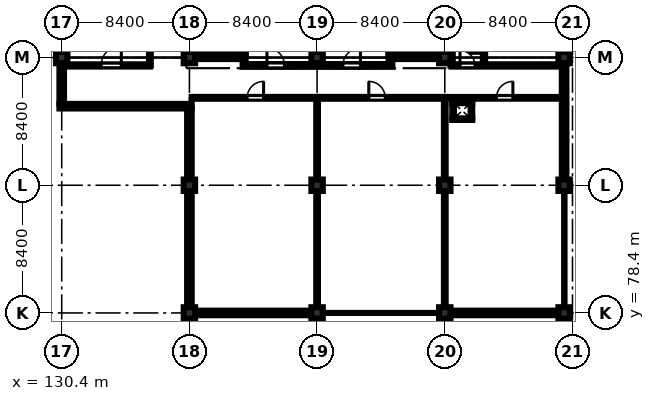
"""IFC4 building model, lengths in metres.
Left out: names, types, materials, properties, quantities, classifications, styles, units other than length and angle.
Written with IfcOpenShell. Run it as: python <this file> out.ifc"""

import sys

from ifc_helpers import new_model, si_unit, direction, frame, frame_2d, origin, origin_2d, place, context, subcontext, project, spatial, rectangle, extrude, element, fill, save


model = new_model("IFC4")
c1 = context("Model", 3, precision=1e-05, world=origin(), true_north=direction((0.0, 1.0)))
c2 = subcontext(c1, "Body", "Model", "MODEL_VIEW")
j1 = project(units=[si_unit("LENGTHUNIT", "METRE"), si_unit("PLANEANGLEUNIT", "RADIAN")], contexts=[c1])
p1 = place(None, origin())
s1 = spatial("IfcSite", under=j1, at=p1, CompositionType="ELEMENT")
p2 = place(p1, origin())
s2 = spatial("IfcBuilding", under=s1, at=p2, CompositionType="ELEMENT")
p3 = place(p2, frame((0.0, 0.0, 52.8)))
s3 = spatial("IfcBuildingStorey", under=s2, at=p3, CompositionType="ELEMENT", Elevation=52.8)
for number, where, z_axis, x_axis in (
    (1, (130.4, 95.2, 0.0), (0.0, 0.0, 1.0), (1.0, 0.0, 0.0)),
    (2, (138.8, 78.4, 0.0), (0.0, 0.0, 1.0), (1.0, 0.0, 0.0)),
    (3, (138.8, 86.8, 0.0), (0.0, 0.0, 1.0), (1.0, 0.0, 0.0)),
    (4, (138.8, 95.2, 0.0), (0.0, 0.0, 1.0), (1.0, 0.0, 0.0)),
    (5, (147.2, 78.4, 0.0), (0.0, 0.0, 1.0), (1.0, 0.0, 0.0)),
    (6, (147.2, 86.8, 0.0), (0.0, 0.0, 1.0), (1.0, 0.0, 0.0)),
    (7, (147.2, 95.2, 0.0), (0.0, 0.0, 1.0), (1.0, 0.0, 0.0)),
    (8, (155.6, 78.4, 0.0), (0.0, 0.0, 1.0), (1.0, 0.0, 0.0)),
    (9, (155.6, 86.8, 0.0), (0.0, 0.0, 1.0), (1.0, 0.0, 0.0)),
    (10, (155.6, 95.2, 0.0), (0.0, 0.0, 1.0), (1.0, 0.0, 0.0)),
    (11, (163.45, 78.4, 0.0), (0.0, 0.0, 1.0), (1.0, 0.0, 0.0)),
    (12, (163.45, 86.8, 0.0), (0.0, 0.0, 1.0), (1.0, 0.0, 0.0)),
    (13, (163.45, 95.2, 0.0), (0.0, 0.0, 1.0), (1.0, 0.0, 0.0)),
):
    element("IfcColumn", number, at=place(p3, frame(where, z_axis=z_axis, x_axis=x_axis)), inside=s3, PredefinedType="COLUMN", context=c2, shape_type="SweptSolid", body=[
        extrude(rectangle(XDim=0.75, YDim=0.75, at=origin_2d()), origin(), (0.0, 0.0, 1.0), 4.03),
    ])
p4 = place(p3, frame((138.7, 95.275, 0.0), z_axis=(0.0, 0.0, 1.0), x_axis=(1.0, 0.0, 0.0)))
e14 = element("IfcWall", 14, at=p4, inside=s3, PredefinedType="SHEAR", context=c2, shape_type="SweptSolid", body=[
    extrude(rectangle(XDim=3.8, YDim=0.35, at=frame_2d((1.9, 0.0))), origin(), (0.0, 0.0, 1.0), 4.03),
])
p5 = place(p3, frame((138.875, 95.45, 0.0), z_axis=(0.0, 0.0, 1.0), x_axis=(0.0, 1.0, 0.0)))
e15 = element("IfcWall", 15, at=p5, inside=s3, PredefinedType="SHEAR", context=c2, shape_type="SweptSolid", body=[
    extrude(rectangle(XDim=7.9, YDim=0.35, at=frame_2d((3.95, 0.0))), origin(), (0.0, 0.0, 1.0), 4.03),
])
p6 = place(p3, frame((142.325, 95.45, 0.0), z_axis=(0.0, 0.0, 1.0), x_axis=(0.0, 1.0, 0.0)))
e16 = element("IfcWall", 16, at=p6, inside=s3, PredefinedType="SHEAR", context=c2, shape_type="SweptSolid", body=[
    extrude(rectangle(XDim=7.9, YDim=0.35, at=frame_2d((3.95, 0.0))), origin(), (0.0, 0.0, 1.0), 4.03),
])
p7 = place(p6, frame((0.22, 0.0, 0.0)))
e17 = element("IfcOpeningElement", 17, at=p7, cuts=e16, PredefinedType="OPENING", context=c2, shape_type="SweptSolid", body=[
    extrude(rectangle(XDim=1.15, YDim=2.15, at=frame_2d((0.575, 1.075))), frame((0.0, 0.185, 0.0), z_axis=(0.0, -1.0, 0.0), x_axis=(1.0, 0.0, 0.0)), (0.0, 0.0, 1.0), 0.37),
])
p8 = place(p3, frame((151.9, 95.275, 0.0), z_axis=(0.0, 0.0, 1.0), x_axis=(1.0, 0.0, 0.0)))
e18 = element("IfcWall", 18, at=p8, inside=s3, PredefinedType="SHEAR", context=c2, shape_type="SweptSolid", body=[
    extrude(rectangle(XDim=3.8, YDim=0.35, at=frame_2d((1.9, 0.0))), origin(), (0.0, 0.0, 1.0), 4.03),
])
p9 = place(p3, frame((152.075, 95.45, 0.0), z_axis=(0.0, 0.0, 1.0), x_axis=(0.0, 1.0, 0.0)))
e19 = element("IfcWall", 19, at=p9, inside=s3, PredefinedType="SHEAR", context=c2, shape_type="SweptSolid", body=[
    extrude(rectangle(XDim=7.9, YDim=0.35, at=frame_2d((3.95, 0.0))), origin(), (0.0, 0.0, 1.0), 4.03),
])
p10 = place(p9, frame((0.35, 0.0, 0.0)))
e20 = element("IfcOpeningElement", 20, at=p10, cuts=e19, PredefinedType="OPENING", context=c2, shape_type="SweptSolid", body=[
    extrude(rectangle(XDim=1.15, YDim=2.15, at=frame_2d((0.575, 1.075))), frame((0.0, 0.185, 0.0), z_axis=(0.0, -1.0, 0.0), x_axis=(1.0, 0.0, 0.0)), (0.0, 0.0, 1.0), 0.37),
])
p11 = place(p3, frame((155.525, 95.45, 0.0), z_axis=(0.0, 0.0, 1.0), x_axis=(0.0, 1.0, 0.0)))
e21 = element("IfcWall", 21, at=p11, inside=s3, PredefinedType="SHEAR", context=c2, shape_type="SweptSolid", body=[
    extrude(rectangle(XDim=7.9, YDim=0.35, at=frame_2d((3.95, 0.0))), origin(), (0.0, 0.0, 1.0), 4.03),
])
p12 = place(p3, frame((146.825, 78.4, 0.0), z_axis=(0.0, 0.0, 1.0), x_axis=(-1.0, 0.0, 0.0)))
e22 = element("IfcWall", 22, at=p12, inside=s3, PredefinedType="STANDARD", context=c2, shape_type="SweptSolid", body=[
    extrude(rectangle(XDim=7.65, YDim=0.3, at=frame_2d((3.825, 0.0))), origin(), (0.0, 0.0, 1.0), 3.33),
])
p13 = place(p12, frame((1.15, 0.0, 0.95)))
e23 = element("IfcOpeningElement", 23, at=p13, cuts=e22, PredefinedType="OPENING", context=c2, shape_type="SweptSolid", body=[
    extrude(rectangle(XDim=1.65, YDim=1.85, at=frame_2d((0.825, 0.925))), frame((0.0, 0.16, 0.0), z_axis=(0.0, -1.0, 0.0), x_axis=(1.0, 0.0, 0.0)), (0.0, 0.0, 1.0), 0.32),
])
p14 = place(p3, frame((163.075, 78.4, 0.0), z_axis=(0.0, 0.0, 1.0), x_axis=(-1.0, 0.0, 0.0)))
e24 = element("IfcWall", 24, at=p14, inside=s3, PredefinedType="STANDARD", context=c2, shape_type="SweptSolid", body=[
    extrude(rectangle(XDim=7.1, YDim=0.3, at=frame_2d((3.55, 0.0))), origin(), (0.0, 0.0, 1.0), 3.33),
])
p15 = place(p14, frame((1.15, 0.0, 0.95)))
e25 = element("IfcOpeningElement", 25, at=p15, cuts=e24, PredefinedType="OPENING", context=c2, shape_type="SweptSolid", body=[
    extrude(rectangle(XDim=1.65, YDim=1.85, at=frame_2d((0.825, 0.925))), frame((0.0, 0.16, 0.0), z_axis=(0.0, -1.0, 0.0), x_axis=(1.0, 0.0, 0.0)), (0.0, 0.0, 1.0), 0.32),
])
p16 = place(p3, frame((163.45, 94.825, 0.0), z_axis=(0.0, 0.0, 1.0), x_axis=(0.0, -1.0, 0.0)))
e26 = element("IfcWall", 26, at=p16, inside=s3, PredefinedType="STANDARD", context=c2, shape_type="SweptSolid", body=[
    extrude(rectangle(XDim=7.65, YDim=0.3, at=frame_2d((3.825, 0.0))), origin(), (0.0, 0.0, 1.0), 3.33),
])
p17 = place(p16, frame((4.2, 0.0, 1.1)))
e27 = element("IfcOpeningElement", 27, at=p17, cuts=e26, PredefinedType="OPENING", context=c2, shape_type="SweptSolid", body=[
    extrude(rectangle(XDim=1.8, YDim=1.8, at=frame_2d((0.9, 0.9))), frame((0.0, 0.16, 0.0), z_axis=(0.0, -1.0, 0.0), x_axis=(1.0, 0.0, 0.0)), (0.0, 0.0, 1.0), 0.32),
])
p18 = place(p3, frame((163.45, 103.225, 0.0), z_axis=(0.0, 0.0, 1.0), x_axis=(0.0, -1.0, 0.0)))
e28 = element("IfcWall", 28, at=p18, inside=s3, PredefinedType="STANDARD", context=c2, shape_type="SweptSolid", body=[
    extrude(rectangle(XDim=7.65, YDim=0.3, at=frame_2d((3.825, 0.0))), origin(), (0.0, 0.0, 1.0), 3.33),
])
p19 = place(p18, frame((1.15, 0.0, 1.1)))
e29 = element("IfcOpeningElement", 29, at=p19, cuts=e28, PredefinedType="OPENING", context=c2, shape_type="SweptSolid", body=[
    extrude(rectangle(XDim=1.4, YDim=1.4, at=frame_2d((0.7, 0.7))), frame((0.0, 0.16, 0.0), z_axis=(0.0, -1.0, 0.0), x_axis=(1.0, 0.0, 0.0)), (0.0, 0.0, 1.0), 0.32),
])
p20 = place(p3, frame((130.4, 92.15, 0.0), z_axis=(0.0, 0.0, 1.0), x_axis=(0.0, 1.0, 0.0)))
e30 = element("IfcWall", 30, at=p20, inside=s3, PredefinedType="STANDARD", context=c2, shape_type="SweptSolid", body=[
    extrude(rectangle(XDim=2.675, YDim=0.3, at=frame_2d((1.337, 0.0))), origin(), (0.0, 0.0, 1.0), 4.03),
])
p21 = place(p3, frame((138.8, 78.775, 0.0), z_axis=(0.0, 0.0, 1.0), x_axis=(0.0, 1.0, 0.0)))
e31 = element("IfcWall", 31, at=p21, inside=s3, PredefinedType="STANDARD", context=c2, shape_type="SweptSolid", body=[
    extrude(rectangle(XDim=7.65, YDim=0.3, at=frame_2d((3.825, 0.0))), origin(), (0.0, 0.0, 1.0), 3.33),
])
p22 = place(p21, frame((2.4, 0.0, 0.95)))
e32 = element("IfcOpeningElement", 32, at=p22, cuts=e31, PredefinedType="OPENING", context=c2, shape_type="SweptSolid", body=[
    extrude(rectangle(XDim=1.5, YDim=1.8, at=frame_2d((0.75, 0.9))), frame((0.0, 0.16, 0.0), z_axis=(0.0, -1.0, 0.0), x_axis=(1.0, 0.0, 0.0)), (0.0, 0.0, 1.0), 0.32),
])
p23 = place(p3, frame((138.8, 87.175, 0.0), z_axis=(0.0, 0.0, 1.0), x_axis=(0.0, 1.0, 0.0)))
e33 = element("IfcWall", 33, at=p23, inside=s3, PredefinedType="STANDARD", context=c2, shape_type="SweptSolid", body=[
    extrude(rectangle(XDim=4.675, YDim=0.3, at=frame_2d((2.337, 0.0))), origin(), (0.0, 0.0, 1.0), 3.33),
])
p24 = place(p23, frame((2.4, 0.0, 0.95)))
e34 = element("IfcOpeningElement", 34, at=p24, cuts=e33, PredefinedType="OPENING", context=c2, shape_type="SweptSolid", body=[
    extrude(rectangle(XDim=1.5, YDim=1.8, at=frame_2d((0.75, 0.9))), frame((0.0, 0.16, 0.0), z_axis=(0.0, -1.0, 0.0), x_axis=(1.0, 0.0, 0.0)), (0.0, 0.0, 1.0), 0.32),
])
p25 = place(p3, frame((130.4, 95.575, 0.0), z_axis=(0.0, 0.0, 1.0), x_axis=(0.0, 1.0, 0.0)))
e35 = element("IfcWall", 35, at=p25, inside=s3, PredefinedType="STANDARD", context=c2, shape_type="SweptSolid", body=[
    extrude(rectangle(XDim=7.65, YDim=0.3, at=frame_2d((3.825, 0.0))), origin(), (0.0, 0.0, 1.0), 3.33),
])
p26 = place(p25, frame((2.4, 0.0, 1.0)))
e36 = element("IfcOpeningElement", 36, at=p26, cuts=e35, PredefinedType="OPENING", context=c2, shape_type="SweptSolid", body=[
    extrude(rectangle(XDim=1.8, YDim=1.8, at=frame_2d((0.9, 0.9))), frame((0.0, 0.16, 0.0), z_axis=(0.0, -1.0, 0.0), x_axis=(1.0, 0.0, 0.0)), (0.0, 0.0, 1.0), 0.32),
])
p27 = place(p3, frame((138.95, 92.0, 0.0), z_axis=(0.0, 0.0, 1.0), x_axis=(-1.0, 0.0, 0.0)))
e37 = element("IfcWall", 37, at=p27, inside=s3, PredefinedType="STANDARD", context=c2, shape_type="SweptSolid", body=[
    extrude(rectangle(XDim=8.7, YDim=0.3, at=frame_2d((4.35, 0.0))), origin(), (0.0, 0.0, 1.0), 4.03),
])
p28 = place(p3, frame((142.3, 94.68, 0.0), z_axis=(0.0, 0.0, 1.0), x_axis=(1.0, 0.0, 0.0)))
e38 = element("IfcWall", 38, at=p28, inside=s3, PredefinedType="STANDARD", context=c2, shape_type="SweptSolid", body=[
    extrude(rectangle(XDim=4.8, YDim=0.18, at=frame_2d((2.4, 0.0))), origin(), (0.0, 0.0, 1.0), 4.03),
])
p29 = place(p28, frame((1.6, 0.0, 0.0)))
e39 = element("IfcOpeningElement", 39, at=p29, cuts=e38, PredefinedType="OPENING", context=c2, shape_type="SweptSolid", body=[
    extrude(rectangle(XDim=1.15, YDim=2.15, at=frame_2d((0.575, 1.075))), frame((0.0, 0.1, 0.0), z_axis=(0.0, -1.0, 0.0), x_axis=(1.0, 0.0, 0.0)), (0.0, 0.0, 1.0), 0.2),
])
p30 = place(p3, frame((147.3, 94.68, 0.0), z_axis=(0.0, 0.0, 1.0), x_axis=(1.0, 0.0, 0.0)))
e40 = element("IfcWall", 40, at=p30, inside=s3, PredefinedType="STANDARD", context=c2, shape_type="SweptSolid", body=[
    extrude(rectangle(XDim=4.85, YDim=0.18, at=frame_2d((2.425, 0.0))), origin(), (0.0, 0.0, 1.0), 4.03),
])
p31 = place(p30, frame((1.6, 0.0, 0.0)))
e41 = element("IfcOpeningElement", 41, at=p31, cuts=e40, PredefinedType="OPENING", context=c2, shape_type="SweptSolid", body=[
    extrude(rectangle(XDim=1.15, YDim=2.15, at=frame_2d((0.575, 1.075))), frame((0.0, 0.1, 0.0), z_axis=(0.0, -1.0, 0.0), x_axis=(1.0, 0.0, 0.0)), (0.0, 0.0, 1.0), 0.2),
])
p32 = place(p3, frame((156.05, 94.68, 0.0), z_axis=(0.0, 0.0, 1.0), x_axis=(1.0, 0.0, 0.0)))
e42 = element("IfcWall", 42, at=p32, inside=s3, PredefinedType="PARTITIONING", context=c2, shape_type="SweptSolid", body=[
    extrude(rectangle(XDim=7.15, YDim=0.15, at=frame_2d((3.575, 0.0))), origin(), (0.0, 0.0, 1.0), 4.03),
])
p33 = place(p32, frame((0.55, 0.0, 0.0)))
e43 = element("IfcOpeningElement", 43, at=p33, cuts=e42, PredefinedType="OPENING", context=c2, shape_type="SweptSolid", body=[
    extrude(rectangle(XDim=0.98, YDim=2.12, at=frame_2d((0.49, 1.06))), frame((0.0, 0.085, 0.0), z_axis=(0.0, -1.0, 0.0), x_axis=(1.0, 0.0, 0.0)), (0.0, 0.0, 1.0), 0.17),
])
p34 = place(p3, frame((158.18, 94.68, 0.0), z_axis=(0.0, 0.0, 1.0), x_axis=(0.0, 1.0, 0.0)))
e44 = element("IfcWall", 44, at=p34, inside=s3, PredefinedType="PARTITIONING", context=c2, shape_type="SweptSolid", body=[
    extrude(rectangle(XDim=8.57, YDim=0.15, at=frame_2d((4.285, 0.0))), origin(), (0.0, 0.0, 1.0), 4.03),
])
p35 = place(p34, frame((0.8, 0.0, 0.0)))
e45 = element("IfcOpeningElement", 45, at=p35, cuts=e44, PredefinedType="OPENING", context=c2, shape_type="SweptSolid", body=[
    extrude(rectangle(XDim=1.0, YDim=2.12, at=frame_2d((0.5, 1.06))), frame((0.0, 0.085, 0.0), z_axis=(0.0, -1.0, 0.0), x_axis=(1.0, 0.0, 0.0)), (0.0, 0.0, 1.0), 0.17),
])
p36 = place(p34, frame((3.5, 0.0, 0.0)))
e46 = element("IfcOpeningElement", 46, at=p36, cuts=e44, PredefinedType="OPENING", context=c2, shape_type="SweptSolid", body=[
    extrude(rectangle(XDim=0.92, YDim=2.1, at=frame_2d((0.46, 1.05))), frame((0.0, 0.085, 0.0), z_axis=(0.0, -1.0, 0.0), x_axis=(1.0, 0.0, 0.0)), (0.0, 0.0, 1.0), 0.17),
])
p37 = place(p34, frame((6.4, 0.0, 0.0)))
e47 = element("IfcOpeningElement", 47, at=p37, cuts=e44, PredefinedType="OPENING", context=c2, shape_type="SweptSolid", body=[
    extrude(rectangle(XDim=0.92, YDim=2.1, at=frame_2d((0.46, 1.05))), frame((0.0, 0.085, 0.0), z_axis=(0.0, -1.0, 0.0), x_axis=(1.0, 0.0, 0.0)), (0.0, 0.0, 1.0), 0.17),
])
p38 = place(p3, frame((156.05, 94.68, 0.0), z_axis=(0.0, 0.0, 1.0), x_axis=(0.0, 1.0, 0.0)))
e48 = element("IfcWall", 48, at=p38, inside=s3, PredefinedType="PARTITIONING", context=c2, shape_type="SweptSolid", body=[
    extrude(rectangle(XDim=8.57, YDim=0.15, at=frame_2d((4.285, 0.0))), origin(), (0.0, 0.0, 1.0), 4.03),
])
p39 = place(p3, frame((136.2, 94.68, 0.0), z_axis=(0.0, 0.0, 1.0), x_axis=(0.0, 1.0, 0.0)))
e49 = element("IfcWall", 49, at=p39, inside=s3, PredefinedType="PARTITIONING", context=c2, shape_type="SweptSolid", body=[
    extrude(rectangle(XDim=9.07, YDim=0.12, at=frame_2d((4.535, 0.0))), origin(), (0.0, 0.0, 1.0), 4.03),
])
p40 = place(p3, frame((130.8, 94.68, 0.0), z_axis=(0.0, 0.0, 1.0), x_axis=(1.0, 0.0, 0.0)))
e50 = element("IfcWall", 50, at=p40, inside=s3, PredefinedType="PARTITIONING", context=c2, shape_type="SweptSolid", body=[
    extrude(rectangle(XDim=5.4, YDim=0.145, at=frame_2d((2.7, 0.0))), origin(), (0.0, 0.0, 1.0), 4.03),
])
p41 = place(p40, frame((2.2, 0.0, 0.0)))
e51 = element("IfcOpeningElement", 51, at=p41, cuts=e50, PredefinedType="OPENING", context=c2, shape_type="SweptSolid", body=[
    extrude(rectangle(XDim=1.32, YDim=2.2, at=frame_2d((0.66, 1.1))), frame((0.0, 0.083, 0.0), z_axis=(0.0, -1.0, 0.0), x_axis=(1.0, 0.0, 0.0)), (0.0, 0.0, 1.0), 0.165),
])
p42 = place(p3, frame((138.95, 92.55, 0.0), z_axis=(0.0, 0.0, 1.0), x_axis=(1.0, 0.0, 0.0)))
e52 = element("IfcWall", 52, at=p42, inside=s3, PredefinedType="PARTITIONING", context=c2, shape_type="SweptSolid", body=[
    extrude(rectangle(XDim=8.25, YDim=0.12, at=frame_2d((4.125, 0.0))), origin(), (0.0, 0.0, 1.0), 4.03),
])
p43 = place(p42, frame((3.65, 0.0, 0.0)))
e53 = element("IfcOpeningElement", 53, at=p43, cuts=e52, PredefinedType="OPENING", context=c2, shape_type="SweptSolid", body=[
    extrude(rectangle(XDim=1.08, YDim=2.15, at=frame_2d((0.54, 1.075))), frame((0.0, 0.07, 0.0), z_axis=(0.0, -1.0, 0.0), x_axis=(1.0, 0.0, 0.0)), (0.0, 0.0, 1.0), 0.14),
])
p44 = place(p3, frame((147.2, 92.55, 0.0), z_axis=(0.0, 0.0, 1.0), x_axis=(1.0, 0.0, 0.0)))
e54 = element("IfcWall", 54, at=p44, inside=s3, PredefinedType="PARTITIONING", context=c2, shape_type="SweptSolid", body=[
    extrude(rectangle(XDim=8.4, YDim=0.12, at=frame_2d((4.2, 0.0))), origin(), (0.0, 0.0, 1.0), 4.03),
])
p45 = place(p44, frame((3.4, 0.0, 0.0)))
e55 = element("IfcOpeningElement", 55, at=p45, cuts=e54, PredefinedType="OPENING", context=c2, shape_type="SweptSolid", body=[
    extrude(rectangle(XDim=1.08, YDim=2.15, at=frame_2d((0.54, 1.075))), frame((0.0, 0.07, 0.0), z_axis=(0.0, -1.0, 0.0), x_axis=(1.0, 0.0, 0.0)), (0.0, 0.0, 1.0), 0.14),
])
p46 = place(p3, frame((147.2, 78.55, 0.0), z_axis=(0.0, 0.0, 1.0), x_axis=(0.0, 1.0, 0.0)))
e56 = element("IfcWall", 56, at=p46, inside=s3, PredefinedType="PARTITIONING", context=c2, shape_type="SweptSolid", body=[
    extrude(rectangle(XDim=14.0, YDim=0.112, at=frame_2d((7.0, 0.0))), origin(), (0.0, 0.0, 1.0), 3.33),
])
p47 = place(p3, frame((155.6, 92.55, 0.0), z_axis=(0.0, 0.0, 1.0), x_axis=(1.0, 0.0, 0.0)))
e57 = element("IfcWall", 57, at=p47, inside=s3, PredefinedType="PARTITIONING", context=c2, shape_type="SweptSolid", body=[
    extrude(rectangle(XDim=7.75, YDim=0.112, at=frame_2d((3.875, 0.0))), origin(), (0.0, 0.0, 1.0), 4.03),
])
p48 = place(p47, frame((3.4, 0.0, 0.0)))
e58 = element("IfcOpeningElement", 58, at=p48, cuts=e57, PredefinedType="OPENING", context=c2, shape_type="SweptSolid", body=[
    extrude(rectangle(XDim=1.08, YDim=2.15, at=frame_2d((0.54, 1.075))), frame((0.0, 0.066, 0.0), z_axis=(0.0, -1.0, 0.0), x_axis=(1.0, 0.0, 0.0)), (0.0, 0.0, 1.0), 0.132),
])
p49 = place(p3, frame((155.6, 78.55, 0.0), z_axis=(0.0, 0.0, 1.0), x_axis=(0.0, 1.0, 0.0)))
e59 = element("IfcWall", 59, at=p49, inside=s3, PredefinedType="PARTITIONING", context=c2, shape_type="SweptSolid", body=[
    extrude(rectangle(XDim=14.0, YDim=0.112, at=frame_2d((7.0, 0.0))), origin(), (0.0, 0.0, 1.0), 3.33),
])
for number, where, z_axis, x_axis in (
    (60, (156.095, 91.147, 0.0), (0.0, 0.0, 1.0), (1.0, 0.0, 0.0)),
    (61, (156.095, 92.252, 0.0), (0.0, 0.0, 1.0), (1.0, 0.0, 0.0)),
):
    element("IfcWall", number, at=place(p3, frame(where, z_axis=z_axis, x_axis=x_axis)), inside=s3, PredefinedType="PARTITIONING", context=c2, shape_type="SweptSolid", body=[
        extrude(rectangle(XDim=1.31, YDim=0.105, at=frame_2d((0.655, 0.0))), origin(), (0.0, 0.0, 1.0), 4.03),
    ])
for number, where, z_axis, x_axis in (
    (62, (156.147, 91.2, 0.0), (0.0, 0.0, 1.0), (0.0, 1.0, 0.0)),
    (63, (157.353, 91.2, 0.0), (0.0, 0.0, 1.0), (0.0, 1.0, 0.0)),
):
    element("IfcWall", number, at=place(p3, frame(where, z_axis=z_axis, x_axis=x_axis)), inside=s3, PredefinedType="PARTITIONING", context=c2, shape_type="SweptSolid", body=[
        extrude(rectangle(XDim=1.0, YDim=0.105, at=frame_2d((0.5, 0.0))), origin(), (0.0, 0.0, 1.0), 4.03),
    ])
p50 = place(p13, origin())
e64 = element("IfcWindow", 64, at=p50, inside=s3, PartitioningType="DOUBLE_PANEL_VERTICAL", PredefinedType="WINDOW", context=c2, shape_type="SweptSolid", body=[
    extrude(rectangle(XDim=1.65, YDim=1.85, at=frame_2d((0.825, 0.925))), frame((0.0, 0.03, 0.0), z_axis=(0.0, -1.0, 0.0), x_axis=(1.0, 0.0, 0.0)), (0.0, 0.0, 1.0), 0.06),
])
fill(e23, e64)
p51 = place(p15, origin())
e65 = element("IfcWindow", 65, at=p51, inside=s3, PartitioningType="DOUBLE_PANEL_VERTICAL", PredefinedType="WINDOW", context=c2, shape_type="SweptSolid", body=[
    extrude(rectangle(XDim=1.65, YDim=1.85, at=frame_2d((0.825, 0.925))), frame((0.0, 0.03, 0.0), z_axis=(0.0, -1.0, 0.0), x_axis=(1.0, 0.0, 0.0)), (0.0, 0.0, 1.0), 0.06),
])
fill(e25, e65)
p52 = place(p17, origin())
e66 = element("IfcWindow", 66, at=p52, inside=s3, PartitioningType="DOUBLE_PANEL_VERTICAL", PredefinedType="WINDOW", context=c2, shape_type="SweptSolid", body=[
    extrude(rectangle(XDim=1.8, YDim=1.8, at=frame_2d((0.9, 0.9))), frame((0.0, 0.03, 0.0), z_axis=(0.0, -1.0, 0.0), x_axis=(1.0, 0.0, 0.0)), (0.0, 0.0, 1.0), 0.06),
])
fill(e27, e66)
p53 = place(p22, origin())
e67 = element("IfcWindow", 67, at=p53, inside=s3, PartitioningType="DOUBLE_PANEL_VERTICAL", PredefinedType="WINDOW", context=c2, shape_type="SweptSolid", body=[
    extrude(rectangle(XDim=1.5, YDim=1.8, at=frame_2d((0.75, 0.9))), frame((0.0, 0.03, 0.0), z_axis=(0.0, -1.0, 0.0), x_axis=(1.0, 0.0, 0.0)), (0.0, 0.0, 1.0), 0.06),
])
fill(e32, e67)
p54 = place(p24, origin())
e68 = element("IfcWindow", 68, at=p54, inside=s3, PartitioningType="DOUBLE_PANEL_VERTICAL", PredefinedType="WINDOW", context=c2, shape_type="SweptSolid", body=[
    extrude(rectangle(XDim=1.5, YDim=1.8, at=frame_2d((0.75, 0.9))), frame((0.0, 0.03, 0.0), z_axis=(0.0, -1.0, 0.0), x_axis=(1.0, 0.0, 0.0)), (0.0, 0.0, 1.0), 0.06),
])
fill(e34, e68)
p55 = place(p29, origin())
e69 = element("IfcDoor", 69, at=p55, inside=s3, OperationType="SINGLE_SWING_LEFT", PredefinedType="DOOR", context=c2, shape_type="SweptSolid", body=[
    extrude(rectangle(XDim=1.15, YDim=2.15, at=frame_2d((0.575, 1.075))), frame((0.0, 0.025, 0.0), z_axis=(0.0, -1.0, 0.0), x_axis=(1.0, 0.0, 0.0)), (0.0, 0.0, 1.0), 0.05),
])
fill(e39, e69)
p56 = place(p31, origin())
e70 = element("IfcDoor", 70, at=p56, inside=s3, OperationType="SINGLE_SWING_RIGHT", PredefinedType="DOOR", context=c2, shape_type="SweptSolid", body=[
    extrude(rectangle(XDim=1.15, YDim=2.15, at=frame_2d((0.575, 1.075))), frame((0.0, 0.025, 0.0), z_axis=(0.0, -1.0, 0.0), x_axis=(1.0, 0.0, 0.0)), (0.0, 0.0, 1.0), 0.05),
])
fill(e41, e70)
p57 = place(p33, origin())
e71 = element("IfcDoor", 71, at=p57, inside=s3, OperationType="SINGLE_SWING_LEFT", PredefinedType="DOOR", context=c2, shape_type="SweptSolid", body=[
    extrude(rectangle(XDim=0.98, YDim=2.12, at=frame_2d((0.49, 1.06))), frame((0.0, 0.025, 0.0), z_axis=(0.0, -1.0, 0.0), x_axis=(1.0, 0.0, 0.0)), (0.0, 0.0, 1.0), 0.05),
])
fill(e43, e71)
p58 = place(p35, origin())
e72 = element("IfcDoor", 72, at=p58, inside=s3, OperationType="SINGLE_SWING_LEFT", PredefinedType="DOOR", context=c2, shape_type="SweptSolid", body=[
    extrude(rectangle(XDim=1.0, YDim=2.12, at=frame_2d((0.5, 1.06))), frame((0.0, 0.025, 0.0), z_axis=(0.0, -1.0, 0.0), x_axis=(1.0, 0.0, 0.0)), (0.0, 0.0, 1.0), 0.05),
])
fill(e45, e72)
p59 = place(p41, origin())
e73 = element("IfcDoor", 73, at=p59, inside=s3, OperationType="SINGLE_SWING_RIGHT", PredefinedType="DOOR", context=c2, shape_type="SweptSolid", body=[
    extrude(rectangle(XDim=1.32, YDim=2.2, at=frame_2d((0.66, 1.1))), frame((0.0, 0.025, 0.0), z_axis=(0.0, -1.0, 0.0), x_axis=(1.0, 0.0, 0.0)), (0.0, 0.0, 1.0), 0.05),
])
fill(e51, e73)
p60 = place(p43, origin())
e74 = element("IfcDoor", 74, at=p60, inside=s3, OperationType="SINGLE_SWING_RIGHT", PredefinedType="DOOR", context=c2, shape_type="SweptSolid", body=[
    extrude(rectangle(XDim=1.08, YDim=2.15, at=frame_2d((0.54, 1.075))), frame((0.0, 0.025, 0.0), z_axis=(0.0, -1.0, 0.0), x_axis=(1.0, 0.0, 0.0)), (0.0, 0.0, 1.0), 0.05),
])
fill(e53, e74)
p61 = place(p45, origin())
e75 = element("IfcDoor", 75, at=p61, inside=s3, OperationType="SINGLE_SWING_LEFT", PredefinedType="DOOR", context=c2, shape_type="SweptSolid", body=[
    extrude(rectangle(XDim=1.08, YDim=2.15, at=frame_2d((0.54, 1.075))), frame((0.0, 0.025, 0.0), z_axis=(0.0, -1.0, 0.0), x_axis=(1.0, 0.0, 0.0)), (0.0, 0.0, 1.0), 0.05),
])
fill(e55, e75)
p62 = place(p48, origin())
e76 = element("IfcDoor", 76, at=p62, inside=s3, OperationType="SINGLE_SWING_RIGHT", PredefinedType="DOOR", context=c2, shape_type="SweptSolid", body=[
    extrude(rectangle(XDim=1.08, YDim=2.15, at=frame_2d((0.54, 1.075))), frame((0.0, 0.025, 0.0), z_axis=(0.0, -1.0, 0.0), x_axis=(1.0, 0.0, 0.0)), (0.0, 0.0, 1.0), 0.05),
])
fill(e58, e76)
save(model, sys.argv[1])
